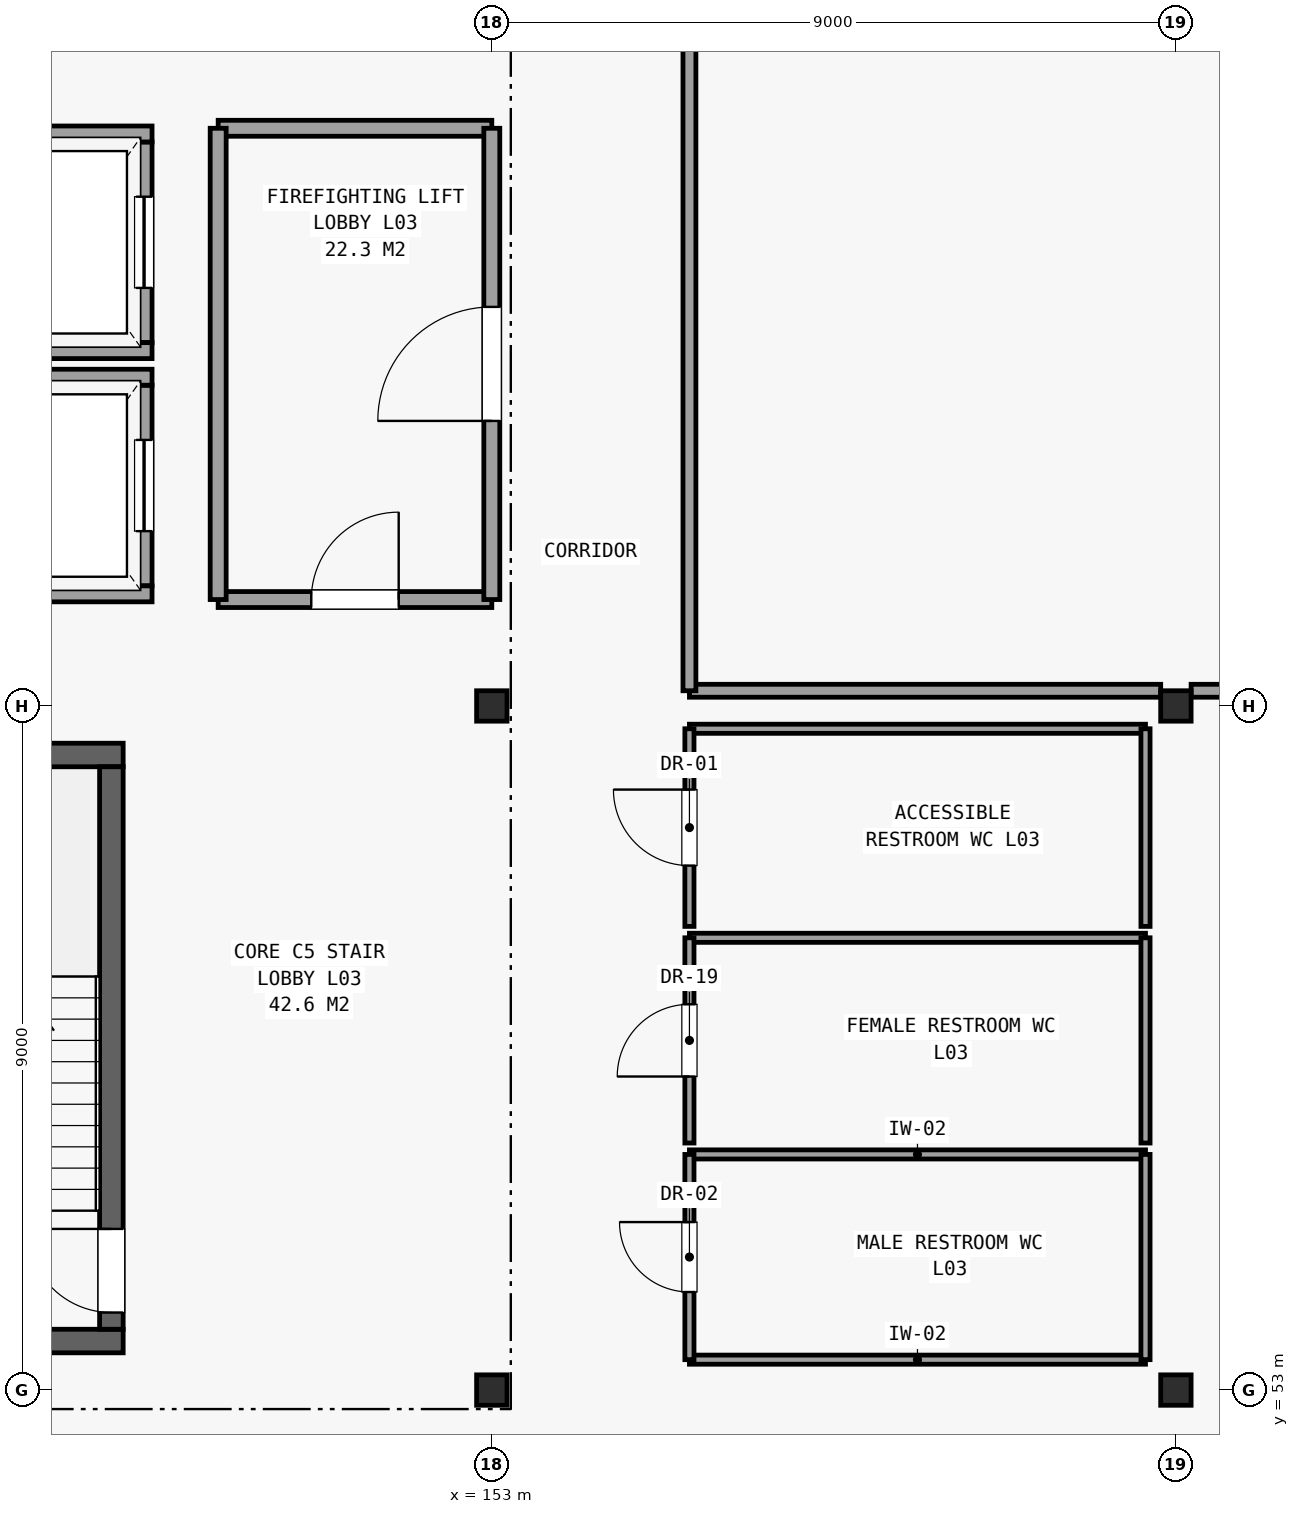
"""IFC4 building model, lengths in metres.
Left out: names, types, materials, properties, quantities, classifications, styles, units other than length and angle.
Written with IfcOpenShell. Run it as: python <this file> out.ifc"""

import sys

from ifc_helpers import new_model, si_unit, direction, frame, frame_2d, origin, origin_2d, place, context, subcontext, project, spatial, rectangle, hollow_rectangle, extrude, element, fill, save


model = new_model("IFC4")
c1 = context("Model", 3, precision=1e-05, world=origin(), true_north=direction((0.0, 1.0)))
c2 = subcontext(c1, "Body", "Model", "MODEL_VIEW")
j1 = project(units=[si_unit("LENGTHUNIT", "METRE"), si_unit("PLANEANGLEUNIT", "RADIAN")], contexts=[c1])
p1 = place(None, origin())
s1 = spatial("IfcSite", under=j1, at=p1, CompositionType="ELEMENT")
p2 = place(p1, origin())
s2 = spatial("IfcBuilding", under=s1, at=p2, CompositionType="ELEMENT")
p3 = place(p2, frame((0.0, 0.0, 13.5)))
s3 = spatial("IfcBuildingStorey", under=s2, at=p3, CompositionType="ELEMENT", Elevation=13.5)
for number, where, z_axis, x_axis in (
    (1, (153.0, 53.0, 0.0), (0.0, 0.0, 1.0), (1.0, 0.0, 0.0)),
    (2, (153.0, 62.0, 0.0), (0.0, 0.0, 1.0), (1.0, 0.0, 0.0)),
    (3, (162.0, 53.0, 0.0), (0.0, 0.0, 1.0), (1.0, 0.0, 0.0)),
    (4, (162.0, 62.0, 0.0), (0.0, 0.0, 1.0), (1.0, 0.0, 0.0)),
):
    element("IfcColumn", number, at=place(p3, frame(where, z_axis=z_axis, x_axis=x_axis)), inside=s3, PredefinedType="COLUMN", context=c2, shape_type="SweptSolid", body=[
        extrude(hollow_rectangle(XDim=0.4, YDim=0.4, WallThickness=0.019, at=origin_2d()), origin(), (0.0, 0.0, 1.0), 4.2),
    ])
for number, where, z_axis, x_axis in (
    (5, (144.25, 53.645, 0.0), (0.0, 0.0, 1.0), (1.0, 0.0, 0.0)),
    (6, (144.25, 61.355, 0.0), (0.0, 0.0, 1.0), (1.0, 0.0, 0.0)),
):
    element("IfcWall", number, at=place(p3, frame(where, z_axis=z_axis, x_axis=x_axis)), inside=s3, PredefinedType="SHEAR", context=c2, shape_type="SweptSolid", body=[
        extrude(rectangle(XDim=3.9, YDim=0.31, at=frame_2d((1.95, 0.0))), origin(), (0.0, 0.0, 1.0), 3.95),
    ])
p4 = place(p3, frame((147.995, 53.8, 0.0), z_axis=(0.0, 0.0, 1.0), x_axis=(0.0, 1.0, 0.0)))
e7 = element("IfcWall", 7, at=p4, inside=s3, PredefinedType="SHEAR", context=c2, shape_type="SweptSolid", body=[
    extrude(rectangle(XDim=7.4, YDim=0.31, at=frame_2d((3.7, 0.0))), origin(), (0.0, 0.0, 1.0), 3.95),
])
p5 = place(p4, frame((0.22, 0.0, 0.0)))
e8 = element("IfcOpeningElement", 8, at=p5, cuts=e7, PredefinedType="OPENING", context=c2, shape_type="SweptSolid", body=[
    extrude(rectangle(XDim=1.1, YDim=2.15, at=frame_2d((0.55, 1.075))), frame((0.0, 0.166, 0.0), z_axis=(0.0, -1.0, 0.0), x_axis=(1.0, 0.0, 0.0)), (0.0, 0.0, 1.0), 0.332),
])
p6 = place(p3, frame((148.425, 63.58, 0.0), z_axis=(0.0, 0.0, 1.0), x_axis=(0.0, 1.0, 0.0)))
e9 = element("IfcWall", 9, at=p6, inside=s3, PredefinedType="PARTITIONING", context=c2, shape_type="SweptSolid", body=[
    extrude(rectangle(XDim=2.64, YDim=0.21, at=frame_2d((1.32, 0.0))), origin(), (0.0, 0.0, 1.0), 3.95),
])
p7 = place(p6, frame((0.72, 0.0, 0.0)))
e10 = element("IfcOpeningElement", 10, at=p7, cuts=e9, PredefinedType="OPENING", context=c2, shape_type="SweptSolid", body=[
    extrude(rectangle(XDim=1.2, YDim=2.2, at=frame_2d((0.6, 1.1))), frame((0.0, 0.116, 0.0), z_axis=(0.0, -1.0, 0.0), x_axis=(1.0, 0.0, 0.0)), (0.0, 0.0, 1.0), 0.232),
])
for number, where, z_axis, x_axis in (
    (11, (146.27, 63.475, 0.0), (0.0, 0.0, 1.0), (1.0, 0.0, 0.0)),
    (12, (146.27, 66.325, 0.0), (0.0, 0.0, 1.0), (1.0, 0.0, 0.0)),
):
    element("IfcWall", number, at=place(p3, frame(where, z_axis=z_axis, x_axis=x_axis)), inside=s3, PredefinedType="PARTITIONING", context=c2, shape_type="SweptSolid", body=[
        extrude(rectangle(XDim=2.26, YDim=0.21, at=frame_2d((1.13, 0.0))), origin(), (0.0, 0.0, 1.0), 3.95),
    ])
p8 = place(p3, frame((148.425, 66.78, 0.0), z_axis=(0.0, 0.0, 1.0), x_axis=(0.0, 1.0, 0.0)))
e13 = element("IfcWall", 13, at=p8, inside=s3, PredefinedType="PARTITIONING", context=c2, shape_type="SweptSolid", body=[
    extrude(rectangle(XDim=2.64, YDim=0.21, at=frame_2d((1.32, 0.0))), origin(), (0.0, 0.0, 1.0), 3.95),
])
p9 = place(p8, frame((0.72, 0.0, 0.0)))
e14 = element("IfcOpeningElement", 14, at=p9, cuts=e13, PredefinedType="OPENING", context=c2, shape_type="SweptSolid", body=[
    extrude(rectangle(XDim=1.2, YDim=2.2, at=frame_2d((0.6, 1.1))), frame((0.0, 0.116, 0.0), z_axis=(0.0, -1.0, 0.0), x_axis=(1.0, 0.0, 0.0)), (0.0, 0.0, 1.0), 0.232),
])
for number, where, z_axis, x_axis in (
    (15, (146.27, 66.675, 0.0), (0.0, 0.0, 1.0), (1.0, 0.0, 0.0)),
    (16, (146.27, 69.525, 0.0), (0.0, 0.0, 1.0), (1.0, 0.0, 0.0)),
):
    element("IfcWall", number, at=place(p3, frame(where, z_axis=z_axis, x_axis=x_axis)), inside=s3, PredefinedType="PARTITIONING", context=c2, shape_type="SweptSolid", body=[
        extrude(rectangle(XDim=2.26, YDim=0.21, at=frame_2d((1.13, 0.0))), origin(), (0.0, 0.0, 1.0), 3.95),
    ])
p10 = place(p3, frame((149.4, 63.4, 0.0), z_axis=(0.0, 0.0, 1.0), x_axis=(1.0, 0.0, 0.0)))
e17 = element("IfcWall", 17, at=p10, inside=s3, PredefinedType="PARTITIONING", context=c2, shape_type="SweptSolid", body=[
    extrude(rectangle(XDim=3.6, YDim=0.21, at=frame_2d((1.8, 0.0))), origin(), (0.0, 0.0, 1.0), 3.3),
])
p11 = place(p10, frame((1.225, 0.0, 0.0)))
e18 = element("IfcOpeningElement", 18, at=p11, cuts=e17, PredefinedType="OPENING", context=c2, shape_type="SweptSolid", body=[
    extrude(rectangle(XDim=1.15, YDim=2.2, at=frame_2d((0.575, 1.1))), frame((0.0, 0.116, 0.0), z_axis=(0.0, -1.0, 0.0), x_axis=(1.0, 0.0, 0.0)), (0.0, 0.0, 1.0), 0.232),
])
p12 = place(p3, frame((149.4, 69.6, 0.0), z_axis=(0.0, 0.0, 1.0), x_axis=(1.0, 0.0, 0.0)))
e19 = element("IfcWall", 19, at=p12, inside=s3, PredefinedType="PARTITIONING", context=c2, shape_type="SweptSolid", body=[
    extrude(rectangle(XDim=3.6, YDim=0.21, at=frame_2d((1.8, 0.0))), origin(), (0.0, 0.0, 1.0), 3.3),
])
p13 = place(p3, frame((149.4, 63.4, 0.0), z_axis=(0.0, 0.0, 1.0), x_axis=(0.0, 1.0, 0.0)))
e20 = element("IfcWall", 20, at=p13, inside=s3, PredefinedType="PARTITIONING", context=c2, shape_type="SweptSolid", body=[
    extrude(rectangle(XDim=6.2, YDim=0.21, at=frame_2d((3.1, 0.0))), origin(), (0.0, 0.0, 1.0), 3.95),
])
p14 = place(p3, frame((153.0, 63.4, 0.0), z_axis=(0.0, 0.0, 1.0), x_axis=(0.0, 1.0, 0.0)))
e21 = element("IfcWall", 21, at=p14, inside=s3, PredefinedType="PARTITIONING", context=c2, shape_type="SweptSolid", body=[
    extrude(rectangle(XDim=6.2, YDim=0.21, at=frame_2d((3.1, 0.0))), origin(), (0.0, 0.0, 1.0), 3.3),
])
p15 = place(p14, frame((2.35, 0.0, 0.0)))
e22 = element("IfcOpeningElement", 22, at=p15, cuts=e21, PredefinedType="OPENING", context=c2, shape_type="SweptSolid", body=[
    extrude(rectangle(XDim=1.5, YDim=2.25, at=frame_2d((0.75, 1.125))), frame((0.0, 0.116, 0.0), z_axis=(0.0, -1.0, 0.0), x_axis=(1.0, 0.0, 0.0)), (0.0, 0.0, 1.0), 0.232),
])
for number, where, z_axis, x_axis in (
    (23, (155.6, 53.4, 0.0), (0.0, 0.0, 1.0), (1.0, 0.0, 0.0)),
    (24, (155.6, 56.1, 0.0), (0.0, 0.0, 1.0), (1.0, 0.0, 0.0)),
):
    element("IfcWall", number, at=place(p3, frame(where, z_axis=z_axis, x_axis=x_axis)), inside=s3, PredefinedType="PARTITIONING", context=c2, shape_type="SweptSolid", body=[
        extrude(rectangle(XDim=6.0, YDim=0.12, at=frame_2d((3.0, 0.0))), origin(), (0.0, 0.0, 1.0), 3.95),
    ])
p16 = place(p3, frame((155.6, 53.4, 0.0), z_axis=(0.0, 0.0, 1.0), x_axis=(0.0, 1.0, 0.0)))
e25 = element("IfcWall", 25, at=p16, inside=s3, PredefinedType="PARTITIONING", context=c2, shape_type="SweptSolid", body=[
    extrude(rectangle(XDim=2.7, YDim=0.12, at=frame_2d((1.35, 0.0))), origin(), (0.0, 0.0, 1.0), 3.95),
])
p17 = place(p16, frame((0.89, 0.0, 0.0)))
e26 = element("IfcOpeningElement", 26, at=p17, cuts=e25, PredefinedType="OPENING", context=c2, shape_type="SweptSolid", body=[
    extrude(rectangle(XDim=0.92, YDim=2.1, at=frame_2d((0.46, 1.05))), frame((0.0, 0.071, 0.0), z_axis=(0.0, -1.0, 0.0), x_axis=(1.0, 0.0, 0.0)), (0.0, 0.0, 1.0), 0.142),
])
p18 = place(p3, frame((161.6, 53.4, 0.0), z_axis=(0.0, 0.0, 1.0), x_axis=(0.0, 1.0, 0.0)))
e27 = element("IfcWall", 27, at=p18, inside=s3, PredefinedType="PARTITIONING", context=c2, shape_type="SweptSolid", body=[
    extrude(rectangle(XDim=2.7, YDim=0.12, at=frame_2d((1.35, 0.0))), origin(), (0.0, 0.0, 1.0), 3.95),
])
p19 = place(p3, frame((155.6, 58.95, 0.0), z_axis=(0.0, 0.0, 1.0), x_axis=(1.0, 0.0, 0.0)))
e28 = element("IfcWall", 28, at=p19, inside=s3, PredefinedType="PARTITIONING", context=c2, shape_type="SweptSolid", body=[
    extrude(rectangle(XDim=6.0, YDim=0.12, at=frame_2d((3.0, 0.0))), origin(), (0.0, 0.0, 1.0), 3.95),
])
p20 = place(p3, frame((155.6, 56.25, 0.0), z_axis=(0.0, 0.0, 1.0), x_axis=(0.0, 1.0, 0.0)))
e29 = element("IfcWall", 29, at=p20, inside=s3, PredefinedType="PARTITIONING", context=c2, shape_type="SweptSolid", body=[
    extrude(rectangle(XDim=2.7, YDim=0.12, at=frame_2d((1.35, 0.0))), origin(), (0.0, 0.0, 1.0), 3.55),
])
p21 = place(p20, frame((0.875, 0.0, 0.0)))
e30 = element("IfcOpeningElement", 30, at=p21, cuts=e29, PredefinedType="OPENING", context=c2, shape_type="SweptSolid", body=[
    extrude(rectangle(XDim=0.95, YDim=2.15, at=frame_2d((0.475, 1.075))), frame((0.0, 0.071, 0.0), z_axis=(0.0, -1.0, 0.0), x_axis=(1.0, 0.0, 0.0)), (0.0, 0.0, 1.0), 0.142),
])
p22 = place(p3, frame((161.6, 56.25, 0.0), z_axis=(0.0, 0.0, 1.0), x_axis=(0.0, 1.0, 0.0)))
e31 = element("IfcWall", 31, at=p22, inside=s3, PredefinedType="PARTITIONING", context=c2, shape_type="SweptSolid", body=[
    extrude(rectangle(XDim=2.7, YDim=0.12, at=frame_2d((1.35, 0.0))), origin(), (0.0, 0.0, 1.0), 3.55),
])
p23 = place(p3, frame((155.6, 61.7, 0.0), z_axis=(0.0, 0.0, 1.0), x_axis=(1.0, 0.0, 0.0)))
e32 = element("IfcWall", 32, at=p23, inside=s3, PredefinedType="PARTITIONING", context=c2, shape_type="SweptSolid", body=[
    extrude(rectangle(XDim=6.0, YDim=0.12, at=frame_2d((3.0, 0.0))), origin(), (0.0, 0.0, 1.0), 3.362),
])
p24 = place(p3, frame((155.6, 59.1, 0.0), z_axis=(0.0, 0.0, 1.0), x_axis=(0.0, 1.0, 0.0)))
e33 = element("IfcWall", 33, at=p24, inside=s3, PredefinedType="PARTITIONING", context=c2, shape_type="SweptSolid", body=[
    extrude(rectangle(XDim=2.6, YDim=0.12, at=frame_2d((1.3, 0.0))), origin(), (0.0, 0.0, 1.0), 3.362),
])
p25 = place(p24, frame((0.8, 0.0, 0.0)))
e34 = element("IfcOpeningElement", 34, at=p25, cuts=e33, PredefinedType="OPENING", context=c2, shape_type="SweptSolid", body=[
    extrude(rectangle(XDim=1.0, YDim=2.15, at=frame_2d((0.5, 1.075))), frame((0.0, 0.071, 0.0), z_axis=(0.0, -1.0, 0.0), x_axis=(1.0, 0.0, 0.0)), (0.0, 0.0, 1.0), 0.142),
])
p26 = place(p3, frame((161.6, 59.1, 0.0), z_axis=(0.0, 0.0, 1.0), x_axis=(0.0, 1.0, 0.0)))
e35 = element("IfcWall", 35, at=p26, inside=s3, PredefinedType="PARTITIONING", context=c2, shape_type="SweptSolid", body=[
    extrude(rectangle(XDim=2.6, YDim=0.12, at=frame_2d((1.3, 0.0))), origin(), (0.0, 0.0, 1.0), 3.362),
])
p27 = place(p3, frame((155.6, 62.2, 0.0), z_axis=(0.0, 0.0, 1.0), x_axis=(1.0, 0.0, 0.0)))
e36 = element("IfcWall", 36, at=p27, inside=s3, PredefinedType="PARTITIONING", context=c2, shape_type="SweptSolid", body=[
    extrude(rectangle(XDim=6.2, YDim=0.17, at=frame_2d((3.1, 0.0))), origin(), (0.0, 0.0, 1.0), 3.3),
])
p28 = place(p3, frame((162.2, 62.2, 0.0), z_axis=(0.0, 0.0, 1.0), x_axis=(1.0, 0.0, 0.0)))
e37 = element("IfcWall", 37, at=p28, inside=s3, PredefinedType="PARTITIONING", context=c2, shape_type="SweptSolid", body=[
    extrude(rectangle(XDim=8.6, YDim=0.17, at=frame_2d((4.3, 0.0))), origin(), (0.0, 0.0, 1.0), 3.3),
])
p29 = place(p3, frame((155.6, 62.2, 0.0), z_axis=(0.0, 0.0, 1.0), x_axis=(0.0, 1.0, 0.0)))
e38 = element("IfcWall", 38, at=p29, inside=s3, PredefinedType="PARTITIONING", context=c2, shape_type="SweptSolid", body=[
    extrude(rectangle(XDim=17.6, YDim=0.17, at=frame_2d((8.8, 0.0))), origin(), (0.0, 0.0, 1.0), 3.362),
])
p30 = place(p29, frame((12.34, 0.0, 0.0)))
e39 = element("IfcOpeningElement", 39, at=p30, cuts=e38, PredefinedType="OPENING", context=c2, shape_type="SweptSolid", body=[
    extrude(rectangle(XDim=1.92, YDim=2.45, at=frame_2d((0.96, 1.225))), frame((0.0, 0.096, 0.0), z_axis=(0.0, -1.0, 0.0), x_axis=(1.0, 0.0, 0.0)), (0.0, 0.0, 1.0), 0.192),
])
p31 = place(p5, origin())
e40 = element("IfcDoor", 40, at=p31, inside=s3, OperationType="SINGLE_SWING_RIGHT", PredefinedType="DOOR", context=c2, shape_type="SweptSolid", body=[
    extrude(rectangle(XDim=1.1, YDim=2.15, at=frame_2d((0.55, 1.075))), frame((0.0, 0.025, 0.0), z_axis=(0.0, -1.0, 0.0), x_axis=(1.0, 0.0, 0.0)), (0.0, 0.0, 1.0), 0.05),
])
fill(e8, e40)
p32 = place(p7, origin())
e41 = element("IfcDoor", 41, at=p32, inside=s3, OperationType="SLIDING_TO_RIGHT", PredefinedType="DOOR", context=c2, shape_type="SweptSolid", body=[
    extrude(rectangle(XDim=1.2, YDim=2.2, at=frame_2d((0.6, 1.1))), frame((0.0, 0.025, 0.0), z_axis=(0.0, -1.0, 0.0), x_axis=(1.0, 0.0, 0.0)), (0.0, 0.0, 1.0), 0.05),
])
fill(e10, e41)
p33 = place(p9, origin())
e42 = element("IfcDoor", 42, at=p33, inside=s3, OperationType="SLIDING_TO_LEFT", PredefinedType="DOOR", context=c2, shape_type="SweptSolid", body=[
    extrude(rectangle(XDim=1.2, YDim=2.2, at=frame_2d((0.6, 1.1))), frame((0.0, 0.025, 0.0), z_axis=(0.0, -1.0, 0.0), x_axis=(1.0, 0.0, 0.0)), (0.0, 0.0, 1.0), 0.05),
])
fill(e14, e42)
p34 = place(p11, origin())
e43 = element("IfcDoor", 43, at=p34, inside=s3, OperationType="SINGLE_SWING_RIGHT", PredefinedType="DOOR", context=c2, shape_type="SweptSolid", body=[
    extrude(rectangle(XDim=1.15, YDim=2.2, at=frame_2d((0.575, 1.1))), frame((0.0, 0.025, 0.0), z_axis=(0.0, -1.0, 0.0), x_axis=(1.0, 0.0, 0.0)), (0.0, 0.0, 1.0), 0.05),
])
fill(e18, e43)
p35 = place(p15, origin())
e44 = element("IfcDoor", 44, at=p35, inside=s3, OperationType="SINGLE_SWING_LEFT", PredefinedType="DOOR", context=c2, shape_type="SweptSolid", body=[
    extrude(rectangle(XDim=1.5, YDim=2.25, at=frame_2d((0.75, 1.125))), frame((0.0, 0.025, 0.0), z_axis=(0.0, -1.0, 0.0), x_axis=(1.0, 0.0, 0.0)), (0.0, 0.0, 1.0), 0.05),
])
fill(e22, e44)
p36 = place(p17, origin())
e45 = element("IfcDoor", 45, at=p36, inside=s3, OperationType="SINGLE_SWING_RIGHT", PredefinedType="DOOR", context=c2, shape_type="SweptSolid", body=[
    extrude(rectangle(XDim=0.92, YDim=2.1, at=frame_2d((0.46, 1.05))), frame((0.0, 0.025, 0.0), z_axis=(0.0, -1.0, 0.0), x_axis=(1.0, 0.0, 0.0)), (0.0, 0.0, 1.0), 0.05),
])
fill(e26, e45)
p37 = place(p21, origin())
e46 = element("IfcDoor", 46, at=p37, inside=s3, OperationType="SINGLE_SWING_LEFT", PredefinedType="DOOR", context=c2, shape_type="SweptSolid", body=[
    extrude(rectangle(XDim=0.95, YDim=2.15, at=frame_2d((0.475, 1.075))), frame((0.0, 0.025, 0.0), z_axis=(0.0, -1.0, 0.0), x_axis=(1.0, 0.0, 0.0)), (0.0, 0.0, 1.0), 0.05),
])
fill(e30, e46)
p38 = place(p25, origin())
e47 = element("IfcDoor", 47, at=p38, inside=s3, OperationType="SINGLE_SWING_RIGHT", PredefinedType="DOOR", context=c2, shape_type="SweptSolid", body=[
    extrude(rectangle(XDim=1.0, YDim=2.15, at=frame_2d((0.5, 1.075))), frame((0.0, 0.025, 0.0), z_axis=(0.0, -1.0, 0.0), x_axis=(1.0, 0.0, 0.0)), (0.0, 0.0, 1.0), 0.05),
])
fill(e34, e47)
save(model, sys.argv[1])
